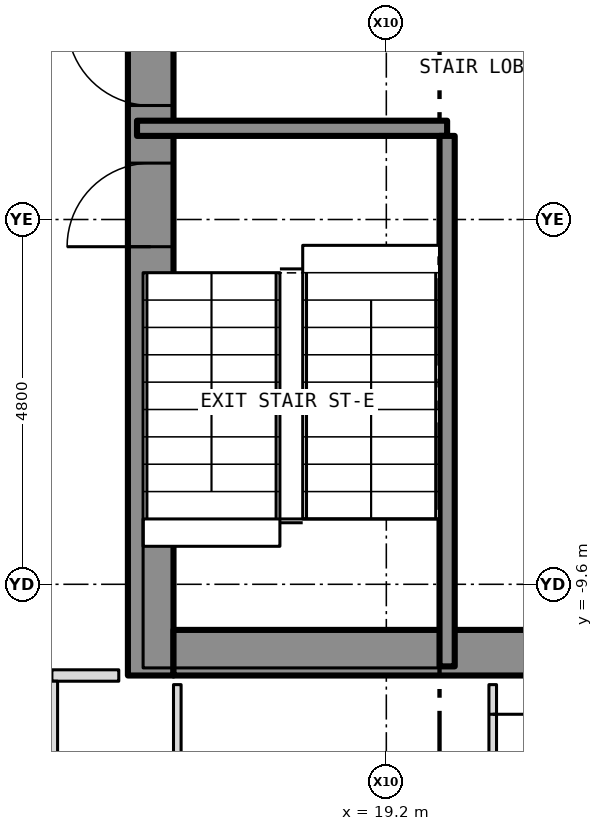
"""IFC4 building model, lengths in metres.
Left out: names, types, materials, properties, quantities, classifications, styles, units other than length and angle.
Written with IfcOpenShell. Run it as: python <this file> out.ifc"""

import sys

from ifc_helpers import new_model, si_unit, direction, frame, frame_2d, origin, place, context, subcontext, project, spatial, rectangle, extrude, element, fill, save


model = new_model("IFC4")
c1 = context("Model", 3, precision=1e-05, world=origin(), true_north=direction((0.0, 1.0)))
c2 = subcontext(c1, "Body", "Model", "MODEL_VIEW")
j1 = project(units=[si_unit("LENGTHUNIT", "METRE"), si_unit("PLANEANGLEUNIT", "RADIAN")], contexts=[c1])
p1 = place(None, origin())
s1 = spatial("IfcSite", under=j1, at=p1, CompositionType="ELEMENT")
p2 = place(p1, origin())
s2 = spatial("IfcBuilding", under=s1, at=p2, CompositionType="ELEMENT")
p3 = place(p2, frame((0.0, 0.0, 89.0)))
s3 = spatial("IfcBuildingStorey", under=s2, at=p3, CompositionType="ELEMENT", Elevation=89.0)
p4 = place(p3, frame((16.1, -10.8, 0.0), z_axis=(0.0, 0.0, 1.0), x_axis=(0.0, 1.0, 0.0)))
e1 = element("IfcWall", 1, at=p4, inside=s3, PredefinedType="SHEAR", context=c2, shape_type="SweptSolid", body=[
    extrude(rectangle(XDim=21.6, YDim=0.6, at=frame_2d((10.8, 0.0))), origin(), (0.0, 0.0, 1.0), 3.25),
])
p5 = place(p4, frame((9.4, 0.0, 0.0)))
e2 = element("IfcOpeningElement", 2, at=p5, cuts=e1, PredefinedType="OPENING", context=c2, shape_type="SweptSolid", body=[
    extrude(rectangle(XDim=1.1, YDim=2.1, at=frame_2d((0.55, 1.05))), frame((0.0, 0.312, 0.0), z_axis=(0.0, -1.0, 0.0), x_axis=(1.0, 0.0, 0.0)), (0.0, 0.0, 1.0), 0.624),
])
p6 = place(p4, frame((11.5, 0.0, 0.0)))
e3 = element("IfcOpeningElement", 3, at=p6, cuts=e1, PredefinedType="OPENING", context=c2, shape_type="SweptSolid", body=[
    extrude(rectangle(XDim=1.1, YDim=2.1, at=frame_2d((0.55, 1.05))), frame((0.0, 0.312, 0.0), z_axis=(0.0, -1.0, 0.0), x_axis=(1.0, 0.0, 0.0)), (0.0, 0.0, 1.0), 0.624),
])
p7 = place(p4, frame((13.6, 0.0, 0.0)))
e4 = element("IfcOpeningElement", 4, at=p7, cuts=e1, PredefinedType="OPENING", context=c2, shape_type="SweptSolid", body=[
    extrude(rectangle(XDim=1.1, YDim=2.1, at=frame_2d((0.55, 1.05))), frame((0.0, 0.312, 0.0), z_axis=(0.0, -1.0, 0.0), x_axis=(1.0, 0.0, 0.0)), (0.0, 0.0, 1.0), 0.624),
])
p8 = place(p4, frame((15.7, 0.0, 0.0)))
e5 = element("IfcOpeningElement", 5, at=p8, cuts=e1, PredefinedType="OPENING", context=c2, shape_type="SweptSolid", body=[
    extrude(rectangle(XDim=1.1, YDim=2.1, at=frame_2d((0.55, 1.05))), frame((0.0, 0.312, 0.0), z_axis=(0.0, -1.0, 0.0), x_axis=(1.0, 0.0, 0.0)), (0.0, 0.0, 1.0), 0.624),
])
p9 = place(p4, frame((17.8, 0.0, 0.0)))
e6 = element("IfcOpeningElement", 6, at=p9, cuts=e1, PredefinedType="OPENING", context=c2, shape_type="SweptSolid", body=[
    extrude(rectangle(XDim=1.1, YDim=2.1, at=frame_2d((0.55, 1.05))), frame((0.0, 0.312, 0.0), z_axis=(0.0, -1.0, 0.0), x_axis=(1.0, 0.0, 0.0)), (0.0, 0.0, 1.0), 0.624),
])
p10 = place(p4, frame((5.642, 0.0, 0.0)))
e7 = element("IfcOpeningElement", 7, at=p10, cuts=e1, PredefinedType="OPENING", context=c2, shape_type="SweptSolid", body=[
    extrude(rectangle(XDim=1.1, YDim=2.1, at=frame_2d((0.55, 1.05))), frame((0.0, 0.312, 0.0), z_axis=(0.0, -1.0, 0.0), x_axis=(1.0, 0.0, 0.0)), (0.0, 0.0, 1.0), 0.624),
])
p11 = place(p4, frame((7.5, 0.0, 0.0)))
e8 = element("IfcOpeningElement", 8, at=p11, cuts=e1, PredefinedType="OPENING", context=c2, shape_type="SweptSolid", body=[
    extrude(rectangle(XDim=1.1, YDim=2.1, at=frame_2d((0.55, 1.05))), frame((0.0, 0.312, 0.0), z_axis=(0.0, -1.0, 0.0), x_axis=(1.0, 0.0, 0.0)), (0.0, 0.0, 1.0), 0.624),
])
p12 = place(p3, frame((16.4, -10.5, 0.0), z_axis=(0.0, 0.0, 1.0), x_axis=(1.0, 0.0, 0.0)))
e9 = element("IfcWall", 9, at=p12, inside=s3, PredefinedType="SHEAR", context=c2, shape_type="SweptSolid", body=[
    extrude(rectangle(XDim=5.8, YDim=0.6, at=frame_2d((2.9, 0.0))), origin(), (0.0, 0.0, 1.0), 3.25),
])
p13 = place(p3, frame((14.8, -10.8, 0.0), z_axis=(0.0, 0.0, 1.0), x_axis=(1.0, 0.0, 0.0)))
e10 = element("IfcWall", 10, at=p13, inside=s3, PredefinedType="PARTITIONING", context=c2, shape_type="SweptSolid", body=[
    extrude(rectangle(XDim=0.88, YDim=0.15, at=frame_2d((0.44, 0.0))), origin(), (0.0, 0.0, 1.0), 3.35),
])
p14 = place(p3, frame((15.92, -3.6, 0.0), z_axis=(0.0, 0.0, 1.0), x_axis=(1.0, 0.0, 0.0)))
e11 = element("IfcWall", 11, at=p14, inside=s3, PredefinedType="SHEAR", context=c2, shape_type="SweptSolid", body=[
    extrude(rectangle(XDim=4.08, YDim=0.2, at=frame_2d((2.04, 0.0))), origin(), (0.0, 0.0, 1.0), 3.25),
])
p15 = place(p3, frame((14.8, -14.725, 0.0), z_axis=(0.0, 0.0, 1.0), x_axis=(0.0, 1.0, 0.0)))
e12 = element("IfcWall", 12, at=p15, inside=s3, PredefinedType="PARTITIONING", context=c2, shape_type="SweptSolid", body=[
    extrude(rectangle(XDim=3.85, YDim=0.15, at=frame_2d((1.925, 0.0))), origin(), (0.0, 0.0, 1.0), 3.35),
])
p16 = place(p15, frame((0.525, 0.0, 0.0)))
e13 = element("IfcOpeningElement", 13, at=p16, cuts=e12, PredefinedType="OPENING", context=c2, shape_type="SweptSolid", body=[
    extrude(rectangle(XDim=1.0, YDim=2.1, at=frame_2d((0.5, 1.05))), frame((0.0, 0.087, 0.0), z_axis=(0.0, -1.0, 0.0), x_axis=(1.0, 0.0, 0.0)), (0.0, 0.0, 1.0), 0.174),
])
p17 = place(p3, frame((16.45, -23.28, 0.0), z_axis=(0.0, 0.0, 1.0), x_axis=(0.0, 1.0, 0.0)))
e14 = element("IfcWall", 14, at=p17, inside=s3, PredefinedType="PARTITIONING", context=c2, shape_type="SweptSolid", body=[
    extrude(rectangle(XDim=12.36, YDim=0.1, at=frame_2d((6.18, 0.0))), origin(), (0.0, 0.0, 1.0), 3.35),
])
p18 = place(p17, frame((6.03, 0.0, 0.0)))
e15 = element("IfcOpeningElement", 15, at=p18, cuts=e14, PredefinedType="OPENING", context=c2, shape_type="SweptSolid", body=[
    extrude(rectangle(XDim=0.9, YDim=2.1, at=frame_2d((0.45, 1.05))), frame((0.0, 0.062, 0.0), z_axis=(0.0, -1.0, 0.0), x_axis=(1.0, 0.0, 0.0)), (0.0, 0.0, 1.0), 0.124),
])
p19 = place(p3, frame((20.0, -10.68, 0.0), z_axis=(0.0, 0.0, 1.0), x_axis=(0.0, 1.0, 0.0)))
e16 = element("IfcWall", 16, at=p19, inside=s3, PredefinedType="SHEAR", context=c2, shape_type="SweptSolid", body=[
    extrude(rectangle(XDim=6.98, YDim=0.2, at=frame_2d((3.49, 0.0))), origin(), (0.0, 0.0, 1.0), 3.25),
])
p20 = place(p3, frame((20.6, -13.95, 0.0), z_axis=(0.0, 0.0, 1.0), x_axis=(0.0, 1.0, 0.0)))
e17 = element("IfcWall", 17, at=p20, inside=s3, PredefinedType="PARTITIONING", context=c2, shape_type="SweptSolid", body=[
    extrude(rectangle(XDim=3.03, YDim=0.1, at=frame_2d((1.515, 0.0))), origin(), (0.0, 0.0, 1.0), 3.35),
])
p21 = place(p20, frame((1.74, 0.0, 0.0)))
e18 = element("IfcOpeningElement", 18, at=p21, cuts=e17, PredefinedType="OPENING", context=c2, shape_type="SweptSolid", body=[
    extrude(rectangle(XDim=0.9, YDim=2.1, at=frame_2d((0.45, 1.05))), frame((0.0, 0.062, 0.0), z_axis=(0.0, -1.0, 0.0), x_axis=(1.0, 0.0, 0.0)), (0.0, 0.0, 1.0), 0.124),
])
p22 = place(p10, origin())
e19 = element("IfcDoor", 19, at=p22, inside=s3, OperationType="SINGLE_SWING_LEFT", PredefinedType="DOOR", context=c2, shape_type="SweptSolid", body=[
    extrude(rectangle(XDim=1.1, YDim=2.1, at=frame_2d((0.55, 1.05))), frame((0.0, 0.025, 0.0), z_axis=(0.0, -1.0, 0.0), x_axis=(1.0, 0.0, 0.0)), (0.0, 0.0, 1.0), 0.05),
])
fill(e7, e19)
p23 = place(p11, origin())
e20 = element("IfcDoor", 20, at=p23, inside=s3, OperationType="SINGLE_SWING_RIGHT", PredefinedType="DOOR", context=c2, shape_type="SweptSolid", body=[
    extrude(rectangle(XDim=1.1, YDim=2.1, at=frame_2d((0.55, 1.05))), frame((0.0, 0.025, 0.0), z_axis=(0.0, -1.0, 0.0), x_axis=(1.0, 0.0, 0.0)), (0.0, 0.0, 1.0), 0.05),
])
fill(e8, e20)
p24 = place(p21, origin())
e21 = element("IfcDoor", 21, at=p24, inside=s3, OperationType="SINGLE_SWING_RIGHT", PredefinedType="DOOR", context=c2, shape_type="SweptSolid", body=[
    extrude(rectangle(XDim=0.9, YDim=2.1, at=frame_2d((0.45, 1.05))), frame((0.0, 0.025, 0.0), z_axis=(0.0, -1.0, 0.0), x_axis=(1.0, 0.0, 0.0)), (0.0, 0.0, 1.0), 0.05),
])
fill(e18, e21)
save(model, sys.argv[1])
